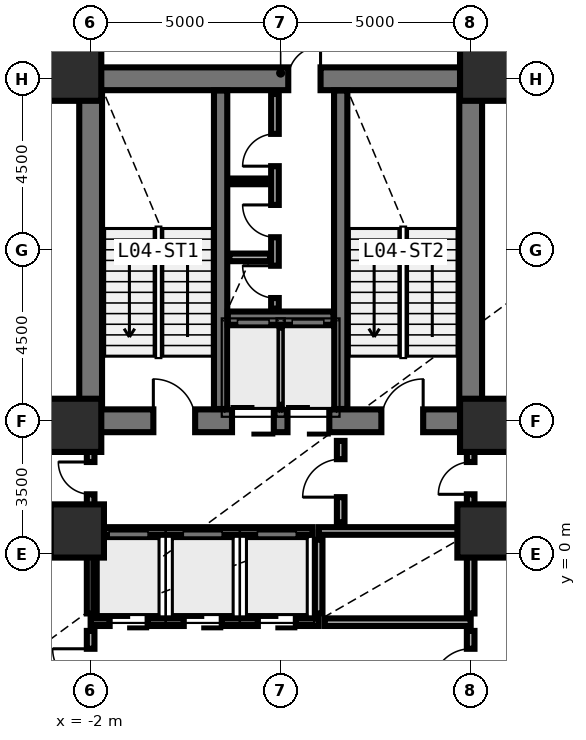
"""IFC4 building model, lengths in metres.
Left out: names, types, materials, properties, quantities, classifications, styles, units other than length and angle.
Written with IfcOpenShell. Run it as: python <this file> out.ifc"""

import sys

from ifc_helpers import new_model, si_unit, direction, frame, frame_2d, origin, origin_2d, place, context, subcontext, project, spatial, rectangle, extrude, element, fill, save


model = new_model("IFC4")
c1 = context("Model", 3, precision=1e-05, world=origin(), true_north=direction((0.0, 1.0)))
c2 = subcontext(c1, "Body", "Model", "MODEL_VIEW")
j1 = project(units=[si_unit("LENGTHUNIT", "METRE"), si_unit("PLANEANGLEUNIT", "RADIAN")], contexts=[c1])
p1 = place(None, origin())
s1 = spatial("IfcSite", under=j1, at=p1, CompositionType="ELEMENT")
p2 = place(p1, origin())
s2 = spatial("IfcBuilding", under=s1, at=p2, CompositionType="ELEMENT")
p3 = place(p2, frame((0.0, 0.0, 18.4)))
s3 = spatial("IfcBuildingStorey", under=s2, at=p3, CompositionType="ELEMENT", Elevation=18.4)
p4 = place(p3, frame((-2.0, 3.5, 0.0), z_axis=(0.0, 0.0, 1.0), x_axis=(1.0, 0.0, 0.0)))
e1 = element("IfcWall", 1, at=p4, inside=s3, PredefinedType="SHEAR", context=c2, shape_type="SweptSolid", body=[
    extrude(rectangle(XDim=10.0, YDim=0.6, at=frame_2d((5.0, 0.0))), origin(), (0.0, 0.0, 1.0), 4.592),
])
p5 = place(p4, frame((1.65, 0.0, 0.0)))
e2 = element("IfcOpeningElement", 2, at=p5, cuts=e1, PredefinedType="OPENING", context=c2, shape_type="SweptSolid", body=[
    extrude(rectangle(XDim=1.1, YDim=2.15, at=frame_2d((0.55, 1.075))), frame((0.0, 0.31, 0.0), z_axis=(0.0, -1.0, 0.0), x_axis=(1.0, 0.0, 0.0)), (0.0, 0.0, 1.0), 0.62),
])
p6 = place(p4, frame((7.65, 0.0, 0.0)))
e3 = element("IfcOpeningElement", 3, at=p6, cuts=e1, PredefinedType="OPENING", context=c2, shape_type="SweptSolid", body=[
    extrude(rectangle(XDim=1.1, YDim=2.15, at=frame_2d((0.55, 1.075))), frame((0.0, 0.31, 0.0), z_axis=(0.0, -1.0, 0.0), x_axis=(1.0, 0.0, 0.0)), (0.0, 0.0, 1.0), 0.62),
])
p7 = place(p4, frame((3.72, 0.0, 0.0)))
e4 = element("IfcOpeningElement", 4, at=p7, cuts=e1, PredefinedType="OPENING", context=c2, shape_type="SweptSolid", body=[
    extrude(rectangle(XDim=1.1, YDim=2.2, at=frame_2d((0.55, 1.1))), frame((0.0, 0.31, 0.0), z_axis=(0.0, -1.0, 0.0), x_axis=(1.0, 0.0, 0.0)), (0.0, 0.0, 1.0), 0.62),
])
p8 = place(p4, frame((5.18, 0.0, 0.0)))
e5 = element("IfcOpeningElement", 5, at=p8, cuts=e1, PredefinedType="OPENING", context=c2, shape_type="SweptSolid", body=[
    extrude(rectangle(XDim=1.1, YDim=2.2, at=frame_2d((0.55, 1.1))), frame((0.0, 0.31, 0.0), z_axis=(0.0, -1.0, 0.0), x_axis=(1.0, 0.0, 0.0)), (0.0, 0.0, 1.0), 0.62),
])
p9 = place(p3, frame((-2.0, 12.5, 0.0), z_axis=(0.0, 0.0, 1.0), x_axis=(1.0, 0.0, 0.0)))
e6 = element("IfcWall", 6, at=p9, inside=s3, PredefinedType="SHEAR", context=c2, shape_type="SweptSolid", body=[
    extrude(rectangle(XDim=10.0, YDim=0.6, at=frame_2d((5.0, 0.0))), origin(), (0.0, 0.0, 1.0), 4.592),
])
p10 = place(p9, frame((5.2, 0.0, 0.0)))
e7 = element("IfcOpeningElement", 7, at=p10, cuts=e6, PredefinedType="OPENING", context=c2, shape_type="SweptSolid", body=[
    extrude(rectangle(XDim=0.85, YDim=2.1, at=frame_2d((0.425, 1.05))), frame((0.0, 0.31, 0.0), z_axis=(0.0, -1.0, 0.0), x_axis=(1.0, 0.0, 0.0)), (0.0, 0.0, 1.0), 0.62),
])
for number, where, z_axis, x_axis in (
    (8, (-2.0, 3.81, 0.0), (0.0, 0.0, 1.0), (0.0, 1.0, 0.0)),
    (9, (8.0, 3.81, 0.0), (0.0, 0.0, 1.0), (0.0, 1.0, 0.0)),
):
    element("IfcWall", number, at=place(p3, frame(where, z_axis=z_axis, x_axis=x_axis)), inside=s3, PredefinedType="SHEAR", context=c2, shape_type="SweptSolid", body=[
        extrude(rectangle(XDim=8.38, YDim=0.6, at=frame_2d((4.19, 0.0))), origin(), (0.0, 0.0, 1.0), 4.592),
    ])
for number, where, z_axis, x_axis in (
    (10, (1.42, 3.81, 0.0), (0.0, 0.0, 1.0), (0.0, 1.0, 0.0)),
    (11, (4.58, 3.81, 0.0), (0.0, 0.0, 1.0), (0.0, 1.0, 0.0)),
):
    element("IfcWall", number, at=place(p3, frame(where, z_axis=z_axis, x_axis=x_axis)), inside=s3, PredefinedType="SHEAR", context=c2, shape_type="SweptSolid", body=[
        extrude(rectangle(XDim=8.38, YDim=0.35, at=frame_2d((4.19, 0.0))), origin(), (0.0, 0.0, 1.0), 4.592),
    ])
p11 = place(p3, frame((1.61, 6.2, 0.0), z_axis=(0.0, 0.0, 1.0), x_axis=(1.0, 0.0, 0.0)))
e12 = element("IfcWall", 12, at=p11, inside=s3, PredefinedType="SHEAR", context=c2, shape_type="SweptSolid", body=[
    extrude(rectangle(XDim=2.78, YDim=0.35, at=frame_2d((1.39, 0.0))), origin(), (0.0, 0.0, 1.0), 4.592),
])
for number, where, z_axis, x_axis in (
    (13, (-2.42, 12.62, 0.0), (0.0, 0.0, 1.0), (1.0, 0.0, 0.0)),
    (14, (8.42, 12.62, 0.0), (0.0, 0.0, 1.0), (1.0, 0.0, 0.0)),
    (15, (-2.42, 3.38, 0.0), (0.0, 0.0, 1.0), (1.0, 0.0, 0.0)),
    (16, (8.42, 3.38, 0.0), (0.0, 0.0, 1.0), (1.0, 0.0, 0.0)),
    (17, (-2.35, 0.6, 0.0), (0.0, 0.0, 1.0), (1.0, 0.0, 0.0)),
    (18, (8.35, 0.6, 0.0), (0.0, 0.0, 1.0), (1.0, 0.0, 0.0)),
):
    element("IfcColumn", number, at=place(p3, frame(where, z_axis=z_axis, x_axis=x_axis)), inside=s3, PredefinedType="COLUMN", context=c2, shape_type="SweptSolid", body=[
        extrude(rectangle(XDim=1.4, YDim=1.4, at=origin_2d()), origin(), (0.0, 0.0, 1.0), 4.575),
    ])
p12 = place(p3, frame((3.0, 3.92, 0.0), z_axis=(0.0, 0.0, 1.0), x_axis=(0.0, 1.0, 0.0)))
e19 = element("IfcWall", 19, at=p12, inside=s3, PredefinedType="SOLIDWALL", context=c2, shape_type="SweptSolid", body=[
    extrude(rectangle(XDim=2.03, YDim=0.2, at=frame_2d((1.015, 0.0))), origin(), (0.0, 0.0, 1.0), 4.28),
])
p13 = place(p3, frame((1.65, 7.8, 0.0), z_axis=(0.0, 0.0, 1.0), x_axis=(1.0, 0.0, 0.0)))
e20 = element("IfcWall", 20, at=p13, inside=s3, PredefinedType="SOLIDWALL", context=c2, shape_type="SweptSolid", body=[
    extrude(rectangle(XDim=1.07, YDim=0.2, at=frame_2d((0.535, 0.0))), origin(), (0.0, 0.0, 1.0), 4.28),
])
p14 = place(p3, frame((4.0, 0.6, 0.0), z_axis=(0.0, 0.0, 1.0), x_axis=(1.0, 0.0, 0.0)))
e21 = element("IfcWall", 21, at=p14, inside=s3, PredefinedType="SOLIDWALL", context=c2, shape_type="SweptSolid", body=[
    extrude(rectangle(XDim=3.88, YDim=0.2, at=frame_2d((1.94, 0.0))), origin(), (0.0, 0.0, 1.0), 3.362),
])
p15 = place(p3, frame((-2.0, -1.8, 0.0), z_axis=(0.0, 0.0, 1.0), x_axis=(1.0, 0.0, 0.0)))
e22 = element("IfcWall", 22, at=p15, inside=s3, PredefinedType="SOLIDWALL", context=c2, shape_type="SweptSolid", body=[
    extrude(rectangle(XDim=6.0, YDim=0.2, at=frame_2d((3.0, 0.0))), origin(), (0.0, 0.0, 1.0), 4.28),
])
p16 = place(p15, frame((0.5, 0.0, 0.0)))
e23 = element("IfcOpeningElement", 23, at=p16, cuts=e22, PredefinedType="OPENING", context=c2, shape_type="SweptSolid", body=[
    extrude(rectangle(XDim=1.0, YDim=2.2, at=frame_2d((0.5, 1.1))), frame((0.0, 0.11, 0.0), z_axis=(0.0, -1.0, 0.0), x_axis=(1.0, 0.0, 0.0)), (0.0, 0.0, 1.0), 0.22),
])
p17 = place(p15, frame((2.45, 0.0, 0.0)))
e24 = element("IfcOpeningElement", 24, at=p17, cuts=e22, PredefinedType="OPENING", context=c2, shape_type="SweptSolid", body=[
    extrude(rectangle(XDim=1.0, YDim=2.2, at=frame_2d((0.5, 1.1))), frame((0.0, 0.11, 0.0), z_axis=(0.0, -1.0, 0.0), x_axis=(1.0, 0.0, 0.0)), (0.0, 0.0, 1.0), 0.22),
])
p18 = place(p15, frame((4.4, 0.0, 0.0)))
e25 = element("IfcOpeningElement", 25, at=p18, cuts=e22, PredefinedType="OPENING", context=c2, shape_type="SweptSolid", body=[
    extrude(rectangle(XDim=1.0, YDim=2.2, at=frame_2d((0.5, 1.1))), frame((0.0, 0.11, 0.0), z_axis=(0.0, -1.0, 0.0), x_axis=(1.0, 0.0, 0.0)), (0.0, 0.0, 1.0), 0.22),
])
p19 = place(p3, frame((-2.0, -1.57, 0.0), z_axis=(0.0, 0.0, 1.0), x_axis=(0.0, 1.0, 0.0)))
e26 = element("IfcWall", 26, at=p19, inside=s3, PredefinedType="SOLIDWALL", context=c2, shape_type="SweptSolid", body=[
    extrude(rectangle(XDim=2.05, YDim=0.2, at=frame_2d((1.025, 0.0))), origin(), (0.0, 0.0, 1.0), 3.362),
])
p20 = place(p3, frame((4.16, -1.8, 0.0), z_axis=(0.0, 0.0, 1.0), x_axis=(1.0, 0.0, 0.0)))
e27 = element("IfcWall", 27, at=p20, inside=s3, PredefinedType="SOLIDWALL", context=c2, shape_type="SweptSolid", body=[
    extrude(rectangle(XDim=3.84, YDim=0.2, at=frame_2d((1.92, 0.0))), origin(), (0.0, 0.0, 1.0), 4.28),
])
p21 = place(p3, frame((4.0, -1.57, 0.0), z_axis=(0.0, 0.0, 1.0), x_axis=(0.0, 1.0, 0.0)))
e28 = element("IfcWall", 28, at=p21, inside=s3, PredefinedType="SOLIDWALL", context=c2, shape_type="SweptSolid", body=[
    extrude(rectangle(XDim=1.94, YDim=0.2, at=frame_2d((0.97, 0.0))), origin(), (0.0, 0.0, 1.0), 4.28),
])
p22 = place(p3, frame((8.0, -1.57, 0.0), z_axis=(0.0, 0.0, 1.0), x_axis=(0.0, 1.0, 0.0)))
e29 = element("IfcWall", 29, at=p22, inside=s3, PredefinedType="SOLIDWALL", context=c2, shape_type="SweptSolid", body=[
    extrude(rectangle(XDim=2.05, YDim=0.2, at=frame_2d((1.025, 0.0))), origin(), (0.0, 0.0, 1.0), 3.362),
])
p23 = place(p3, frame((2.85, 6.45, 0.0), z_axis=(0.0, 0.0, 1.0), x_axis=(0.0, 1.0, 0.0)))
e30 = element("IfcWall", 30, at=p23, inside=s3, PredefinedType="MOVABLE", context=c2, shape_type="SweptSolid", body=[
    extrude(rectangle(XDim=5.65, YDim=0.2, at=frame_2d((2.825, 0.0))), origin(), (0.0, 0.0, 1.0), 4.28),
])
p24 = place(p23, frame((1.88, 0.0, 0.0)))
e31 = element("IfcOpeningElement", 31, at=p24, cuts=e30, PredefinedType="OPENING", context=c2, shape_type="SweptSolid", body=[
    extrude(rectangle(XDim=0.85, YDim=2.05, at=frame_2d((0.425, 1.025))), frame((0.0, 0.11, 0.0), z_axis=(0.0, -1.0, 0.0), x_axis=(1.0, 0.0, 0.0)), (0.0, 0.0, 1.0), 0.22),
])
p25 = place(p23, frame((3.75, 0.0, 0.0)))
e32 = element("IfcOpeningElement", 32, at=p25, cuts=e30, PredefinedType="OPENING", context=c2, shape_type="SweptSolid", body=[
    extrude(rectangle(XDim=0.85, YDim=2.1, at=frame_2d((0.425, 1.05))), frame((0.0, 0.11, 0.0), z_axis=(0.0, -1.0, 0.0), x_axis=(1.0, 0.0, 0.0)), (0.0, 0.0, 1.0), 0.22),
])
p26 = place(p23, frame((0.28, 0.0, 0.0)))
e33 = element("IfcOpeningElement", 33, at=p26, cuts=e30, PredefinedType="OPENING", context=c2, shape_type="SweptSolid", body=[
    extrude(rectangle(XDim=0.85, YDim=2.1, at=frame_2d((0.425, 1.05))), frame((0.0, 0.11, 0.0), z_axis=(0.0, -1.0, 0.0), x_axis=(1.0, 0.0, 0.0)), (0.0, 0.0, 1.0), 0.22),
])
p27 = place(p3, frame((4.58, 0.83, 0.0), z_axis=(0.0, 0.0, 1.0), x_axis=(0.0, 1.0, 0.0)))
e34 = element("IfcWall", 34, at=p27, inside=s3, PredefinedType="MOVABLE", context=c2, shape_type="SweptSolid", body=[
    extrude(rectangle(XDim=2.14, YDim=0.2, at=frame_2d((1.07, 0.0))), origin(), (0.0, 0.0, 1.0), 4.28),
])
p28 = place(p27, frame((0.66, 0.0, 0.0)))
e35 = element("IfcOpeningElement", 35, at=p28, cuts=e34, PredefinedType="OPENING", context=c2, shape_type="SweptSolid", body=[
    extrude(rectangle(XDim=1.0, YDim=2.1, at=frame_2d((0.5, 1.05))), frame((0.0, 0.11, 0.0), z_axis=(0.0, -1.0, 0.0), x_axis=(1.0, 0.0, 0.0)), (0.0, 0.0, 1.0), 0.22),
])
p29 = place(p3, frame((-2.0, 0.72, 0.0), z_axis=(0.0, 0.0, 1.0), x_axis=(0.0, 1.0, 0.0)))
e36 = element("IfcWall", 36, at=p29, inside=s3, PredefinedType="MOVABLE", context=c2, shape_type="SweptSolid", body=[
    extrude(rectangle(XDim=2.25, YDim=0.2, at=frame_2d((1.125, 0.0))), origin(), (0.0, 0.0, 1.0), 3.512),
])
p30 = place(p29, frame((0.845, 0.0, 0.0)))
e37 = element("IfcOpeningElement", 37, at=p30, cuts=e36, PredefinedType="OPENING", context=c2, shape_type="SweptSolid", body=[
    extrude(rectangle(XDim=0.85, YDim=2.1, at=frame_2d((0.425, 1.05))), frame((0.0, 0.11, 0.0), z_axis=(0.0, -1.0, 0.0), x_axis=(1.0, 0.0, 0.0)), (0.0, 0.0, 1.0), 0.22),
])
p31 = place(p3, frame((8.0, 0.72, 0.0), z_axis=(0.0, 0.0, 1.0), x_axis=(0.0, 1.0, 0.0)))
e38 = element("IfcWall", 38, at=p31, inside=s3, PredefinedType="MOVABLE", context=c2, shape_type="SweptSolid", body=[
    extrude(rectangle(XDim=2.25, YDim=0.2, at=frame_2d((1.125, 0.0))), origin(), (0.0, 0.0, 1.0), 3.512),
])
p32 = place(p31, frame((0.845, 0.0, 0.0)))
e39 = element("IfcOpeningElement", 39, at=p32, cuts=e38, PredefinedType="OPENING", context=c2, shape_type="SweptSolid", body=[
    extrude(rectangle(XDim=0.85, YDim=2.1, at=frame_2d((0.425, 1.05))), frame((0.0, 0.11, 0.0), z_axis=(0.0, -1.0, 0.0), x_axis=(1.0, 0.0, 0.0)), (0.0, 0.0, 1.0), 0.22),
])
p33 = place(p3, frame((-2.0, -3.97, 0.0), z_axis=(0.0, 0.0, 1.0), x_axis=(0.0, 1.0, 0.0)))
e40 = element("IfcWall", 40, at=p33, inside=s3, PredefinedType="MOVABLE", context=c2, shape_type="SweptSolid", body=[
    extrude(rectangle(XDim=1.94, YDim=0.2, at=frame_2d((0.97, 0.0))), origin(), (0.0, 0.0, 1.0), 3.362),
])
p34 = place(p33, frame((0.47, 0.0, 0.0)))
e41 = element("IfcOpeningElement", 41, at=p34, cuts=e40, PredefinedType="OPENING", context=c2, shape_type="SweptSolid", body=[
    extrude(rectangle(XDim=1.0, YDim=2.1, at=frame_2d((0.5, 1.05))), frame((0.0, 0.11, 0.0), z_axis=(0.0, -1.0, 0.0), x_axis=(1.0, 0.0, 0.0)), (0.0, 0.0, 1.0), 0.22),
])
p35 = place(p3, frame((8.0, -3.97, 0.0), z_axis=(0.0, 0.0, 1.0), x_axis=(0.0, 1.0, 0.0)))
e42 = element("IfcWall", 42, at=p35, inside=s3, PredefinedType="MOVABLE", context=c2, shape_type="SweptSolid", body=[
    extrude(rectangle(XDim=1.94, YDim=0.2, at=frame_2d((0.97, 0.0))), origin(), (0.0, 0.0, 1.0), 3.362),
])
p36 = place(p35, frame((0.47, 0.0, 0.0)))
e43 = element("IfcOpeningElement", 43, at=p36, cuts=e42, PredefinedType="OPENING", context=c2, shape_type="SweptSolid", body=[
    extrude(rectangle(XDim=1.0, YDim=2.1, at=frame_2d((0.5, 1.05))), frame((0.0, 0.11, 0.0), z_axis=(0.0, -1.0, 0.0), x_axis=(1.0, 0.0, 0.0)), (0.0, 0.0, 1.0), 0.22),
])
p37 = place(p3, frame((1.65, 9.8, 0.0), z_axis=(0.0, 0.0, 1.0), x_axis=(1.0, 0.0, 0.0)))
e44 = element("IfcWall", 44, at=p37, inside=s3, PredefinedType="PARTITIONING", context=c2, shape_type="SweptSolid", body=[
    extrude(rectangle(XDim=0.96, YDim=0.15, at=frame_2d((0.48, 0.0))), origin(), (0.0, 0.0, 1.0), 4.28),
])
p38 = place(p3, frame((-1.88, 0.6, 0.0), z_axis=(0.0, 0.0, 1.0), x_axis=(1.0, 0.0, 0.0)))
e45 = element("IfcWall", 45, at=p38, inside=s3, PredefinedType="MOVABLE", context=c2, shape_type="SweptSolid", body=[
    extrude(rectangle(XDim=5.72, YDim=0.2, at=frame_2d((2.86, 0.0))), origin(), (0.0, 0.0, 1.0), 3.362),
])
p39 = place(p5, origin())
e46 = element("IfcDoor", 46, at=p39, inside=s3, OperationType="SINGLE_SWING_LEFT", PredefinedType="DOOR", context=c2, shape_type="SweptSolid", body=[
    extrude(rectangle(XDim=1.1, YDim=2.15, at=frame_2d((0.55, 1.075))), frame((0.0, 0.025, 0.0), z_axis=(0.0, -1.0, 0.0), x_axis=(1.0, 0.0, 0.0)), (0.0, 0.0, 1.0), 0.05),
])
fill(e2, e46)
p40 = place(p6, origin())
e47 = element("IfcDoor", 47, at=p40, inside=s3, OperationType="SINGLE_SWING_RIGHT", PredefinedType="DOOR", context=c2, shape_type="SweptSolid", body=[
    extrude(rectangle(XDim=1.1, YDim=2.15, at=frame_2d((0.55, 1.075))), frame((0.0, 0.025, 0.0), z_axis=(0.0, -1.0, 0.0), x_axis=(1.0, 0.0, 0.0)), (0.0, 0.0, 1.0), 0.05),
])
fill(e3, e47)
p41 = place(p7, origin())
e48 = element("IfcDoor", 48, at=p41, inside=s3, OperationType="DOUBLE_DOOR_SLIDING", PredefinedType="DOOR", context=c2, shape_type="SweptSolid", body=[
    extrude(rectangle(XDim=1.1, YDim=2.2, at=frame_2d((0.55, 1.1))), frame((0.0, 0.025, 0.0), z_axis=(0.0, -1.0, 0.0), x_axis=(1.0, 0.0, 0.0)), (0.0, 0.0, 1.0), 0.05),
])
fill(e4, e48)
p42 = place(p8, origin())
e49 = element("IfcDoor", 49, at=p42, inside=s3, OperationType="DOUBLE_DOOR_SLIDING", PredefinedType="DOOR", context=c2, shape_type="SweptSolid", body=[
    extrude(rectangle(XDim=1.1, YDim=2.2, at=frame_2d((0.55, 1.1))), frame((0.0, 0.025, 0.0), z_axis=(0.0, -1.0, 0.0), x_axis=(1.0, 0.0, 0.0)), (0.0, 0.0, 1.0), 0.05),
])
fill(e5, e49)
p43 = place(p10, origin())
e50 = element("IfcDoor", 50, at=p43, inside=s3, OperationType="SINGLE_SWING_RIGHT", PredefinedType="DOOR", context=c2, shape_type="SweptSolid", body=[
    extrude(rectangle(XDim=0.85, YDim=2.1, at=frame_2d((0.425, 1.05))), frame((0.0, 0.025, 0.0), z_axis=(0.0, -1.0, 0.0), x_axis=(1.0, 0.0, 0.0)), (0.0, 0.0, 1.0), 0.05),
])
fill(e7, e50)
p44 = place(p24, origin())
e51 = element("IfcDoor", 51, at=p44, inside=s3, OperationType="SINGLE_SWING_RIGHT", PredefinedType="DOOR", context=c2, shape_type="SweptSolid", body=[
    extrude(rectangle(XDim=0.85, YDim=2.05, at=frame_2d((0.425, 1.025))), frame((0.0, 0.025, 0.0), z_axis=(0.0, -1.0, 0.0), x_axis=(1.0, 0.0, 0.0)), (0.0, 0.0, 1.0), 0.05),
])
fill(e31, e51)
p45 = place(p25, origin())
e52 = element("IfcDoor", 52, at=p45, inside=s3, OperationType="SINGLE_SWING_LEFT", PredefinedType="DOOR", context=c2, shape_type="SweptSolid", body=[
    extrude(rectangle(XDim=0.85, YDim=2.1, at=frame_2d((0.425, 1.05))), frame((0.0, 0.025, 0.0), z_axis=(0.0, -1.0, 0.0), x_axis=(1.0, 0.0, 0.0)), (0.0, 0.0, 1.0), 0.05),
])
fill(e32, e52)
p46 = place(p26, origin())
e53 = element("IfcDoor", 53, at=p46, inside=s3, OperationType="SINGLE_SWING_RIGHT", PredefinedType="DOOR", context=c2, shape_type="SweptSolid", body=[
    extrude(rectangle(XDim=0.85, YDim=2.1, at=frame_2d((0.425, 1.05))), frame((0.0, 0.025, 0.0), z_axis=(0.0, -1.0, 0.0), x_axis=(1.0, 0.0, 0.0)), (0.0, 0.0, 1.0), 0.05),
])
fill(e33, e53)
p47 = place(p28, origin())
e54 = element("IfcDoor", 54, at=p47, inside=s3, OperationType="SINGLE_SWING_LEFT", PredefinedType="DOOR", context=c2, shape_type="SweptSolid", body=[
    extrude(rectangle(XDim=1.0, YDim=2.1, at=frame_2d((0.5, 1.05))), frame((0.0, 0.025, 0.0), z_axis=(0.0, -1.0, 0.0), x_axis=(1.0, 0.0, 0.0)), (0.0, 0.0, 1.0), 0.05),
])
fill(e35, e54)
p48 = place(p30, origin())
e55 = element("IfcDoor", 55, at=p48, inside=s3, OperationType="SINGLE_SWING_RIGHT", PredefinedType="DOOR", context=c2, shape_type="SweptSolid", body=[
    extrude(rectangle(XDim=0.85, YDim=2.1, at=frame_2d((0.425, 1.05))), frame((0.0, 0.025, 0.0), z_axis=(0.0, -1.0, 0.0), x_axis=(1.0, 0.0, 0.0)), (0.0, 0.0, 1.0), 0.05),
])
fill(e37, e55)
p49 = place(p32, origin())
e56 = element("IfcDoor", 56, at=p49, inside=s3, OperationType="SINGLE_SWING_LEFT", PredefinedType="DOOR", context=c2, shape_type="SweptSolid", body=[
    extrude(rectangle(XDim=0.85, YDim=2.1, at=frame_2d((0.425, 1.05))), frame((0.0, 0.025, 0.0), z_axis=(0.0, -1.0, 0.0), x_axis=(1.0, 0.0, 0.0)), (0.0, 0.0, 1.0), 0.05),
])
fill(e39, e56)
p50 = place(p34, origin())
e57 = element("IfcDoor", 57, at=p50, inside=s3, OperationType="SINGLE_SWING_RIGHT", PredefinedType="DOOR", context=c2, shape_type="SweptSolid", body=[
    extrude(rectangle(XDim=1.0, YDim=2.1, at=frame_2d((0.5, 1.05))), frame((0.0, 0.025, 0.0), z_axis=(0.0, -1.0, 0.0), x_axis=(1.0, 0.0, 0.0)), (0.0, 0.0, 1.0), 0.05),
])
fill(e41, e57)
p51 = place(p36, origin())
e58 = element("IfcDoor", 58, at=p51, inside=s3, OperationType="SINGLE_SWING_LEFT", PredefinedType="DOOR", context=c2, shape_type="SweptSolid", body=[
    extrude(rectangle(XDim=1.0, YDim=2.1, at=frame_2d((0.5, 1.05))), frame((0.0, 0.025, 0.0), z_axis=(0.0, -1.0, 0.0), x_axis=(1.0, 0.0, 0.0)), (0.0, 0.0, 1.0), 0.05),
])
fill(e43, e58)
p52 = place(p16, origin())
e59 = element("IfcDoor", 59, at=p52, inside=s3, OperationType="DOUBLE_DOOR_SLIDING", PredefinedType="DOOR", context=c2, shape_type="SweptSolid", body=[
    extrude(rectangle(XDim=1.0, YDim=2.2, at=frame_2d((0.5, 1.1))), frame((0.0, 0.025, 0.0), z_axis=(0.0, -1.0, 0.0), x_axis=(1.0, 0.0, 0.0)), (0.0, 0.0, 1.0), 0.05),
])
fill(e23, e59)
p53 = place(p17, origin())
e60 = element("IfcDoor", 60, at=p53, inside=s3, OperationType="DOUBLE_DOOR_SLIDING", PredefinedType="DOOR", context=c2, shape_type="SweptSolid", body=[
    extrude(rectangle(XDim=1.0, YDim=2.2, at=frame_2d((0.5, 1.1))), frame((0.0, 0.025, 0.0), z_axis=(0.0, -1.0, 0.0), x_axis=(1.0, 0.0, 0.0)), (0.0, 0.0, 1.0), 0.05),
])
fill(e24, e60)
p54 = place(p18, origin())
e61 = element("IfcDoor", 61, at=p54, inside=s3, OperationType="DOUBLE_DOOR_SLIDING", PredefinedType="DOOR", context=c2, shape_type="SweptSolid", body=[
    extrude(rectangle(XDim=1.0, YDim=2.2, at=frame_2d((0.5, 1.1))), frame((0.0, 0.025, 0.0), z_axis=(0.0, -1.0, 0.0), x_axis=(1.0, 0.0, 0.0)), (0.0, 0.0, 1.0), 0.05),
])
fill(e25, e61)
save(model, sys.argv[1])
